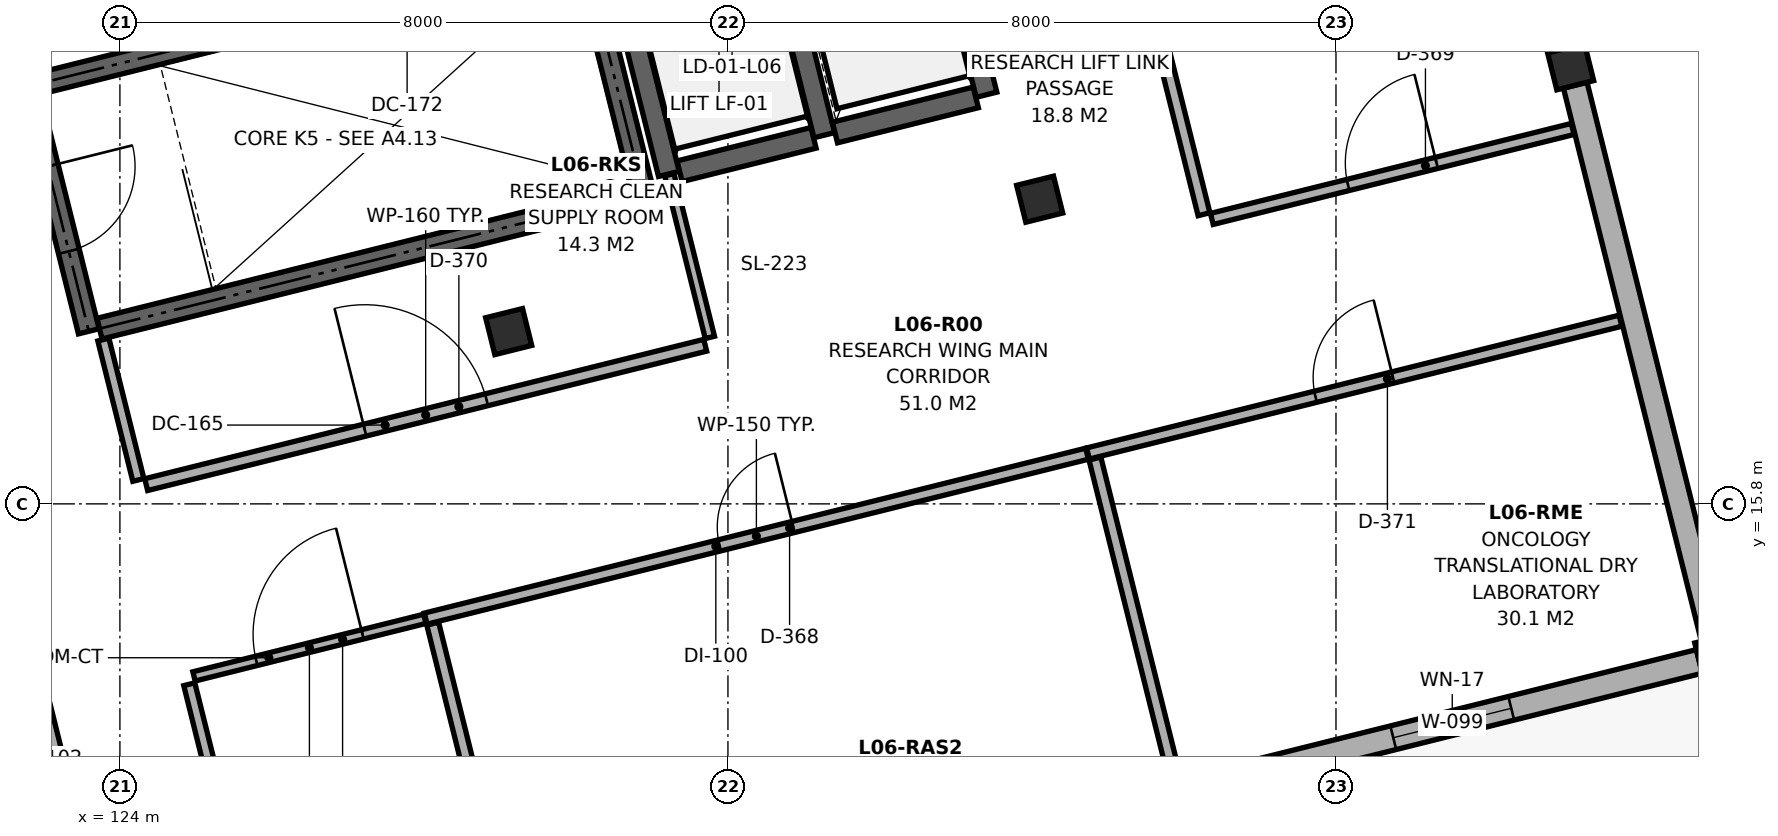
"""IFC4 building model, lengths in metres.
Left out: names, types, materials, properties, quantities, classifications, styles, units other than length and angle.
Written with IfcOpenShell. Run it as: python <this file> out.ifc"""

import sys

from ifc_helpers import new_model, si_unit, direction, frame, frame_2d, origin, origin_2d, place, context, subcontext, project, spatial, rectangle, extrude, element, fill, save


model = new_model("IFC4")
c1 = context("Model", 3, precision=1e-05, world=origin(), true_north=direction((0.0, 1.0)))
c2 = subcontext(c1, "Body", "Model", "MODEL_VIEW")
j1 = project(units=[si_unit("LENGTHUNIT", "METRE"), si_unit("PLANEANGLEUNIT", "RADIAN")], contexts=[c1])
p1 = place(None, origin())
s1 = spatial("IfcSite", under=j1, at=p1, CompositionType="ELEMENT")
p2 = place(p1, origin())
s2 = spatial("IfcBuilding", under=s1, at=p2, CompositionType="ELEMENT")
p3 = place(p2, frame((0.0, 0.0, 25.5)))
s3 = spatial("IfcBuildingStorey", under=s2, at=p3, CompositionType="ELEMENT", Elevation=25.5)
p4 = place(p3, frame((129.115, 18.067, 0.0), z_axis=(0.0, 0.0, 1.0), x_axis=(0.970295726276, 0.2419218956, 0.0)))
e1 = element("IfcColumn", 1, at=p4, inside=s3, PredefinedType="COLUMN", context=c2, shape_type="SweptSolid", body=[
    extrude(rectangle(XDim=0.5, YDim=0.5, at=origin_2d()), origin(), (0.0, 0.0, 1.0), 4.42),
])
p5 = place(p3, frame((136.102, 19.808, 0.0), z_axis=(0.0, 0.0, 1.0), x_axis=(0.970295726276, 0.2419218956, 0.0)))
e2 = element("IfcColumn", 2, at=p5, inside=s3, PredefinedType="COLUMN", context=c2, shape_type="SweptSolid", body=[
    extrude(rectangle(XDim=0.5, YDim=0.5, at=origin_2d()), origin(), (0.0, 0.0, 1.0), 3.818),
])
for number, where, z_axis, x_axis in (
    (3, (145.023, 13.788, 0.0), (0.0, 0.0, 1.0), (0.97, 0.242, 0.0)),
    (4, (143.088, 21.55, 0.0), (0.0, 0.0, 1.0), (0.97, 0.242, 0.0)),
):
    element("IfcColumn", number, at=place(p3, frame(where, z_axis=z_axis, x_axis=x_axis)), inside=s3, PredefinedType="COLUMN", context=c2, shape_type="SweptSolid", body=[
        extrude(rectangle(XDim=0.5, YDim=0.5, at=origin_2d()), origin(), (0.0, 0.0, 1.0), 4.738),
    ])
p6 = place(p3, frame((143.148, 21.308, 0.0), z_axis=(0.0, 0.0, 1.0), x_axis=(0.241930483572, -0.970293585014, 0.0)))
e5 = element("IfcWall", 5, at=p6, inside=s3, PredefinedType="SOLIDWALL", context=c2, shape_type="SweptSolid", body=[
    extrude(rectangle(XDim=7.5, YDim=0.32, at=frame_2d((3.75, 0.0))), origin(), (0.0, 0.0, 1.0), 3.7),
])
p7 = place(p3, frame((144.781, 13.727, 0.0), z_axis=(0.0, 0.0, 1.0), x_axis=(-0.970296633454, -0.241918257079, 0.0)))
e6 = element("IfcWall", 6, at=p7, inside=s3, PredefinedType="SOLIDWALL", context=c2, shape_type="SweptSolid", body=[
    extrude(rectangle(XDim=6.7, YDim=0.32, at=frame_2d((3.35, 0.0))), origin(), (0.0, 0.0, 1.0), 3.7),
])
p8 = place(p7, frame((2.55, 0.0, 0.9)))
e7 = element("IfcOpeningElement", 7, at=p8, cuts=e6, PredefinedType="OPENING", context=c2, shape_type="SweptSolid", body=[
    extrude(rectangle(XDim=1.6, YDim=1.3, at=frame_2d((0.8, 0.65))), frame((0.0, 0.172, 0.0), z_axis=(0.0, -1.0, 0.0), x_axis=(1.0, 0.0, 0.0)), (0.0, 0.0, 1.0), 0.344),
])
p9 = place(p3, frame((124.004, 8.805, 0.0), z_axis=(0.0, 0.0, 1.0), x_axis=(-0.241922842305, 0.970295490235, 0.0)))
e8 = element("IfcWall", 8, at=p9, inside=s3, PredefinedType="SOLIDWALL", context=c2, shape_type="SweptSolid", body=[
    extrude(rectangle(XDim=7.5, YDim=0.32, at=frame_2d((3.75, 0.0))), origin(), (0.0, 0.0, 1.0), 3.7),
])
p10 = place(p9, frame((2.75, 0.0, 0.9)))
e9 = element("IfcOpeningElement", 9, at=p10, cuts=e8, PredefinedType="OPENING", context=c2, shape_type="SweptSolid", body=[
    extrude(rectangle(XDim=2.0, YDim=1.9, at=frame_2d((1.0, 0.95))), frame((0.0, 0.172, 0.0), z_axis=(0.0, -1.0, 0.0), x_axis=(1.0, 0.0, 0.0)), (0.0, 0.0, 1.0), 0.344),
])
p11 = place(p3, frame((123.731, 18.105, 0.0), z_axis=(0.0, 0.0, 1.0), x_axis=(0.970297238923, 0.241915828623, 0.0)))
e10 = element("IfcWall", 10, at=p11, inside=s3, PredefinedType="SHEAR", context=c2, shape_type="SweptSolid", body=[
    extrude(rectangle(XDim=7.23, YDim=0.28, at=frame_2d((3.615, 0.0))), origin(), (0.0, 0.0, 1.0), 3.8),
])
p12 = place(p3, frame((130.887, 19.889, 0.0), z_axis=(0.0, 0.0, 1.0), x_axis=(-0.241947258837, 0.970289402158, 0.0)))
e11 = element("IfcWall", 11, at=p12, inside=s3, PredefinedType="SHEAR", context=c2, shape_type="SweptSolid", body=[
    extrude(rectangle(XDim=3.32, YDim=0.28, at=frame_2d((1.66, 0.0))), origin(), (0.0, 0.0, 1.0), 3.8),
])
p13 = place(p3, frame((129.943, 23.076, 0.0), z_axis=(0.0, 0.0, 1.0), x_axis=(-0.970289312034, -0.241947620266, 0.0)))
e12 = element("IfcWall", 12, at=p13, inside=s3, PredefinedType="SHEAR", context=c2, shape_type="SweptSolid", body=[
    extrude(rectangle(XDim=7.23, YDim=0.28, at=frame_2d((3.615, 0.0))), origin(), (0.0, 0.0, 1.0), 3.8),
])
p14 = place(p3, frame((122.787, 21.292, 0.0), z_axis=(0.0, 0.0, 1.0), x_axis=(0.241860763027, -0.970310966293, 0.0)))
e13 = element("IfcWall", 13, at=p14, inside=s3, PredefinedType="SHEAR", context=c2, shape_type="SweptSolid", body=[
    extrude(rectangle(XDim=3.32, YDim=0.28, at=frame_2d((1.66, 0.0))), origin(), (0.0, 0.0, 1.0), 3.8),
])
p15 = place(p14, frame((1.085, 0.0, 0.0)))
e14 = element("IfcOpeningElement", 14, at=p15, cuts=e13, PredefinedType="OPENING", context=c2, shape_type="SweptSolid", body=[
    extrude(rectangle(XDim=1.15, YDim=2.15, at=frame_2d((0.575, 1.075))), frame((0.0, 0.152, 0.0), z_axis=(0.0, -1.0, 0.0), x_axis=(1.0, 0.0, 0.0)), (0.0, 0.0, 1.0), 0.304),
])
p16 = place(p3, frame((131.363, 20.176, 0.0), z_axis=(0.0, 0.0, 1.0), x_axis=(0.970284587517, 0.241966566341, 0.0)))
e15 = element("IfcWall", 15, at=p16, inside=s3, PredefinedType="SHEAR", context=c2, shape_type="SweptSolid", body=[
    extrude(rectangle(XDim=1.817, YDim=0.28, at=frame_2d((0.909, 0.0))), origin(), (0.0, 0.0, 1.0), 5.3),
])
for number, where, z_axis, x_axis in (
    (16, (133.267, 20.651, 0.0), (0.0, 0.0, 1.0), (-0.242, 0.97, 0.0)),
    (17, (130.498, 23.046, 0.0), (0.0, 0.0, 1.0), (0.242, -0.97, 0.0)),
):
    element("IfcWall", number, at=place(p3, frame(where, z_axis=z_axis, x_axis=x_axis)), inside=s3, PredefinedType="SHEAR", context=c2, shape_type="SweptSolid", body=[
        extrude(rectangle(XDim=2.994, YDim=0.28, at=frame_2d((1.497, 0.0))), origin(), (0.0, 0.0, 1.0), 5.3),
    ])
p17 = place(p3, frame((133.408, 20.686, 0.0), z_axis=(0.0, 0.0, 1.0), x_axis=(0.970285190026, 0.241964150272, 0.0)))
e18 = element("IfcWall", 18, at=p17, inside=s3, PredefinedType="SHEAR", context=c2, shape_type="SweptSolid", body=[
    extrude(rectangle(XDim=1.91, YDim=0.28, at=frame_2d((0.955, 0.0))), origin(), (0.0, 0.0, 1.0), 5.3),
])
p18 = place(p3, frame((135.402, 21.183, 0.0), z_axis=(0.0, 0.0, 1.0), x_axis=(-0.241921647353, 0.970295788171, 0.0)))
e19 = element("IfcWall", 19, at=p18, inside=s3, PredefinedType="SHEAR", context=c2, shape_type="SweptSolid", body=[
    extrude(rectangle(XDim=2.994, YDim=0.28, at=frame_2d((1.497, 0.0))), origin(), (0.0, 0.0, 1.0), 5.3),
])
p19 = place(p3, frame((124.346, 16.053, 0.0), z_axis=(0.0, 0.0, 1.0), x_axis=(0.970295772287, 0.241921711059, 0.0)))
e20 = element("IfcWall", 20, at=p19, inside=s3, PredefinedType="PARTITIONING", context=c2, shape_type="SweptSolid", body=[
    extrude(rectangle(XDim=7.58, YDim=0.16, at=frame_2d((3.79, 0.0))), origin(), (0.0, 0.0, 1.0), 3.7),
])
p20 = place(p19, frame((2.965, 0.0, 0.0)))
e21 = element("IfcOpeningElement", 21, at=p20, cuts=e20, PredefinedType="OPENING", context=c2, shape_type="SweptSolid", body=[
    extrude(rectangle(XDim=1.65, YDim=2.32, at=frame_2d((0.825, 1.16))), frame((0.0, 0.092, 0.0), z_axis=(0.0, -1.0, 0.0), x_axis=(1.0, 0.0, 0.0)), (0.0, 0.0, 1.0), 0.184),
])
p21 = place(p3, frame((124.975, 13.53, 0.0), z_axis=(0.0, 0.0, 1.0), x_axis=(0.970289141252, 0.241948305158, 0.0)))
e22 = element("IfcWall", 22, at=p21, inside=s3, PredefinedType="PARTITIONING", context=c2, shape_type="SweptSolid", body=[
    extrude(rectangle(XDim=3.13, YDim=0.125, at=frame_2d((1.565, 0.0))), origin(), (0.0, 0.0, 1.0), 3.7),
])
p22 = place(p21, frame((0.845, 0.0, 0.0)))
e23 = element("IfcOpeningElement", 23, at=p22, cuts=e22, PredefinedType="OPENING", context=c2, shape_type="SweptSolid", body=[
    extrude(rectangle(XDim=1.44, YDim=2.32, at=frame_2d((0.72, 1.16))), frame((0.0, 0.074, 0.0), z_axis=(0.0, -1.0, 0.0), x_axis=(1.0, 0.0, 0.0)), (0.0, 0.0, 1.0), 0.149),
])
p23 = place(p3, frame((128.023, 14.29, 0.0), z_axis=(0.0, 0.0, 1.0), x_axis=(0.9702992324, 0.241907832869, 0.0)))
e24 = element("IfcWall", 24, at=p23, inside=s3, PredefinedType="PARTITIONING", context=c2, shape_type="SweptSolid", body=[
    extrude(rectangle(XDim=8.968, YDim=0.15, at=frame_2d((4.484, 0.0))), origin(), (0.0, 0.0, 1.0), 3.7),
])
p24 = place(p23, frame((3.984, 0.0, 0.0)))
e25 = element("IfcOpeningElement", 25, at=p24, cuts=e24, PredefinedType="OPENING", context=c2, shape_type="SweptSolid", body=[
    extrude(rectangle(XDim=1.0, YDim=2.15, at=frame_2d((0.5, 1.075))), frame((0.0, 0.087, 0.0), z_axis=(0.0, -1.0, 0.0), x_axis=(1.0, 0.0, 0.0)), (0.0, 0.0, 1.0), 0.174),
])
p25 = place(p3, frame((136.737, 16.463, 0.0), z_axis=(0.0, 0.0, 1.0), x_axis=(0.970289496005, 0.24194688248, 0.0)))
e26 = element("IfcWall", 26, at=p25, inside=s3, PredefinedType="PARTITIONING", context=c2, shape_type="SweptSolid", body=[
    extrude(rectangle(XDim=7.221, YDim=0.15, at=frame_2d((3.61, 0.0))), origin(), (0.0, 0.0, 1.0), 3.7),
])
p26 = place(p25, frame((3.085, 0.0, 0.0)))
e27 = element("IfcOpeningElement", 27, at=p26, cuts=e26, PredefinedType="OPENING", context=c2, shape_type="SweptSolid", body=[
    extrude(rectangle(XDim=1.05, YDim=2.15, at=frame_2d((0.525, 1.075))), frame((0.0, 0.087, 0.0), z_axis=(0.0, -1.0, 0.0), x_axis=(1.0, 0.0, 0.0)), (0.0, 0.0, 1.0), 0.174),
])
p27 = place(p3, frame((138.367, 19.549, 0.0), z_axis=(0.0, 0.0, 1.0), x_axis=(0.970289077222, 0.241948561938, 0.0)))
e28 = element("IfcWall", 28, at=p27, inside=s3, PredefinedType="PARTITIONING", context=c2, shape_type="SweptSolid", body=[
    extrude(rectangle(XDim=4.893, YDim=0.15, at=frame_2d((2.446, 0.0))), origin(), (0.0, 0.0, 1.0), 3.7),
])
p28 = place(p27, frame((1.846, 0.0, 0.0)))
e29 = element("IfcOpeningElement", 29, at=p28, cuts=e28, PredefinedType="OPENING", context=c2, shape_type="SweptSolid", body=[
    extrude(rectangle(XDim=1.2, YDim=2.15, at=frame_2d((0.6, 1.075))), frame((0.0, 0.087, 0.0), z_axis=(0.0, -1.0, 0.0), x_axis=(1.0, 0.0, 0.0)), (0.0, 0.0, 1.0), 0.174),
])
p29 = place(p3, frame((124.243, 16.115, 0.0), z_axis=(0.0, 0.0, 1.0), x_axis=(-0.241962034071, 0.970285717749, 0.0)))
e30 = element("IfcWall", 30, at=p29, inside=s3, PredefinedType="PARTITIONING", context=c2, shape_type="SweptSolid", body=[
    extrude(rectangle(XDim=1.903, YDim=0.15, at=frame_2d((0.952, 0.0))), origin(), (0.0, 0.0, 1.0), 3.7),
])
p30 = place(p3, frame((131.763, 17.99, 0.0), z_axis=(0.0, 0.0, 1.0), x_axis=(-0.241962612769, 0.970285573438, 0.0)))
e31 = element("IfcWall", 31, at=p30, inside=s3, PredefinedType="PARTITIONING", context=c2, shape_type="SweptSolid", body=[
    extrude(rectangle(XDim=2.206, YDim=0.125, at=frame_2d((1.103, 0.0))), origin(), (0.0, 0.0, 1.0), 3.7),
])
p31 = place(p3, frame((126.607, 6.632, 0.0), z_axis=(0.0, 0.0, 1.0), x_axis=(-0.241944970231, 0.970289972833, 0.0)))
e32 = element("IfcWall", 32, at=p31, inside=s3, PredefinedType="PARTITIONING", context=c2, shape_type="SweptSolid", body=[
    extrude(rectangle(XDim=7.003, YDim=0.15, at=frame_2d((3.501, 0.0))), origin(), (0.0, 0.0, 1.0), 3.7),
])
p32 = place(p3, frame((129.809, 7.43, 0.0), z_axis=(0.0, 0.0, 1.0), x_axis=(-0.241911968874, 0.970298201233, 0.0)))
e33 = element("IfcWall", 33, at=p32, inside=s3, PredefinedType="PARTITIONING", context=c2, shape_type="SweptSolid", body=[
    extrude(rectangle(XDim=7.001, YDim=0.16, at=frame_2d((3.5, 0.0))), origin(), (0.0, 0.0, 1.0), 3.7),
])
p33 = place(p3, frame((137.87, 12.22, 0.0), z_axis=(0.0, 0.0, 1.0), x_axis=(-0.241948270812, 0.970289149816, 0.0)))
e34 = element("IfcWall", 34, at=p33, inside=s3, PredefinedType="PARTITIONING", context=c2, shape_type="SweptSolid", body=[
    extrude(rectangle(XDim=4.304, YDim=0.16, at=frame_2d((2.152, 0.0))), origin(), (0.0, 0.0, 1.0), 3.7),
])
p34 = place(p3, frame((138.264, 19.611, 0.0), z_axis=(0.0, 0.0, 1.0), x_axis=(-0.241937132378, 0.970291927193, 0.0)))
e35 = element("IfcWall", 35, at=p34, inside=s3, PredefinedType="PARTITIONING", context=c2, shape_type="SweptSolid", body=[
    extrude(rectangle(XDim=8.543, YDim=0.16, at=frame_2d((4.271, 0.0))), origin(), (0.0, 0.0, 1.0), 3.7),
])
p35 = place(p8, origin())
e36 = element("IfcWindow", 36, at=p35, inside=s3, PartitioningType="DOUBLE_PANEL_VERTICAL", PredefinedType="WINDOW", context=c2, shape_type="SweptSolid", body=[
    extrude(rectangle(XDim=1.6, YDim=1.3, at=frame_2d((0.8, 0.65))), frame((0.0, 0.03, 0.0), z_axis=(0.0, -1.0, 0.0), x_axis=(1.0, 0.0, 0.0)), (0.0, 0.0, 1.0), 0.06),
])
fill(e7, e36)
p36 = place(p10, origin())
e37 = element("IfcWindow", 37, at=p36, inside=s3, PartitioningType="DOUBLE_PANEL_VERTICAL", PredefinedType="WINDOW", context=c2, shape_type="SweptSolid", body=[
    extrude(rectangle(XDim=2.0, YDim=1.9, at=frame_2d((1.0, 0.95))), frame((0.0, 0.03, 0.0), z_axis=(0.0, -1.0, 0.0), x_axis=(1.0, 0.0, 0.0)), (0.0, 0.0, 1.0), 0.06),
])
fill(e9, e37)
p37 = place(p15, origin())
e38 = element("IfcDoor", 38, at=p37, inside=s3, OperationType="SINGLE_SWING_LEFT", PredefinedType="DOOR", context=c2, shape_type="SweptSolid", body=[
    extrude(rectangle(XDim=1.15, YDim=2.15, at=frame_2d((0.575, 1.075))), frame((0.0, 0.025, 0.0), z_axis=(0.0, -1.0, 0.0), x_axis=(1.0, 0.0, 0.0)), (0.0, 0.0, 1.0), 0.05),
])
fill(e14, e38)
p38 = place(p20, origin())
e39 = element("IfcDoor", 39, at=p38, inside=s3, OperationType="SINGLE_SWING_LEFT", PredefinedType="DOOR", context=c2, shape_type="SweptSolid", body=[
    extrude(rectangle(XDim=1.65, YDim=2.32, at=frame_2d((0.825, 1.16))), frame((0.0, 0.025, 0.0), z_axis=(0.0, -1.0, 0.0), x_axis=(1.0, 0.0, 0.0)), (0.0, 0.0, 1.0), 0.05),
])
fill(e21, e39)
p39 = place(p22, origin())
e40 = element("IfcDoor", 40, at=p39, inside=s3, OperationType="SINGLE_SWING_RIGHT", PredefinedType="DOOR", context=c2, shape_type="SweptSolid", body=[
    extrude(rectangle(XDim=1.44, YDim=2.32, at=frame_2d((0.72, 1.16))), frame((0.0, 0.025, 0.0), z_axis=(0.0, -1.0, 0.0), x_axis=(1.0, 0.0, 0.0)), (0.0, 0.0, 1.0), 0.05),
])
fill(e23, e40)
p40 = place(p24, origin())
e41 = element("IfcDoor", 41, at=p40, inside=s3, OperationType="SINGLE_SWING_RIGHT", PredefinedType="DOOR", context=c2, shape_type="SweptSolid", body=[
    extrude(rectangle(XDim=1.0, YDim=2.15, at=frame_2d((0.5, 1.075))), frame((0.0, 0.025, 0.0), z_axis=(0.0, -1.0, 0.0), x_axis=(1.0, 0.0, 0.0)), (0.0, 0.0, 1.0), 0.05),
])
fill(e25, e41)
p41 = place(p26, origin())
e42 = element("IfcDoor", 42, at=p41, inside=s3, OperationType="SINGLE_SWING_RIGHT", PredefinedType="DOOR", context=c2, shape_type="SweptSolid", body=[
    extrude(rectangle(XDim=1.05, YDim=2.15, at=frame_2d((0.525, 1.075))), frame((0.0, 0.025, 0.0), z_axis=(0.0, -1.0, 0.0), x_axis=(1.0, 0.0, 0.0)), (0.0, 0.0, 1.0), 0.05),
])
fill(e27, e42)
p42 = place(p28, origin())
e43 = element("IfcDoor", 43, at=p42, inside=s3, OperationType="SINGLE_SWING_RIGHT", PredefinedType="DOOR", context=c2, shape_type="SweptSolid", body=[
    extrude(rectangle(XDim=1.2, YDim=2.15, at=frame_2d((0.6, 1.075))), frame((0.0, 0.025, 0.0), z_axis=(0.0, -1.0, 0.0), x_axis=(1.0, 0.0, 0.0)), (0.0, 0.0, 1.0), 0.05),
])
fill(e29, e43)
save(model, sys.argv[1])
